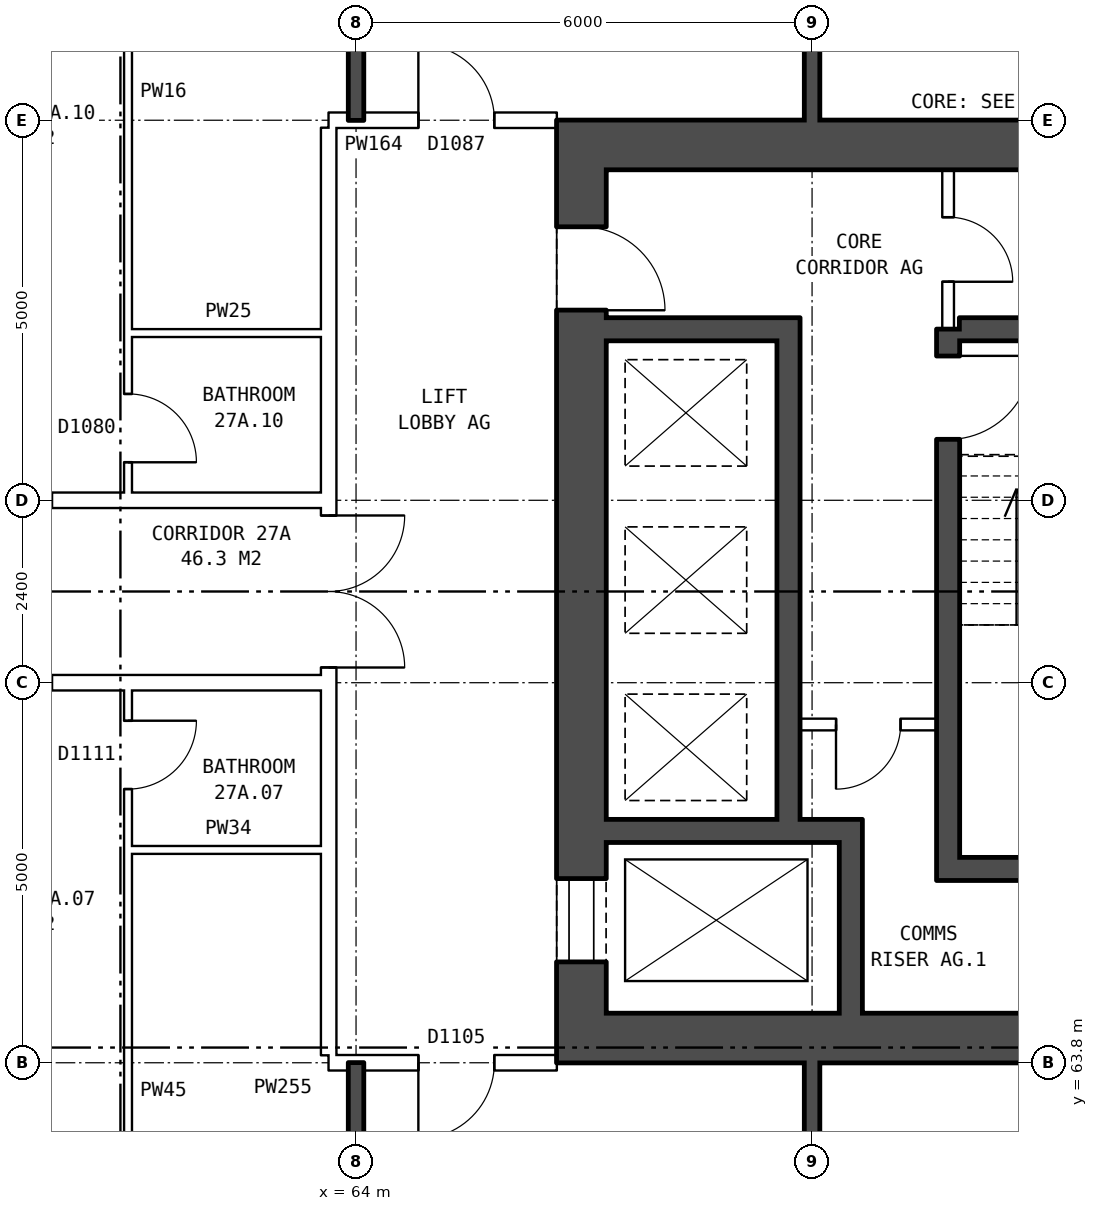
"""IFC4 building model, lengths in metres.
Left out: names, types, materials, properties, quantities, classifications, styles, units other than length and angle.
Written with IfcOpenShell. Run it as: python <this file> out.ifc"""

import sys

from ifc_helpers import new_model, si_unit, direction, frame, frame_2d, origin, place, context, subcontext, project, spatial, rectangle, extrude, element, fill, save


model = new_model("IFC4")
c1 = context("Model", 3, precision=1e-05, world=origin(), true_north=direction((0.0, 1.0)))
c2 = subcontext(c1, "Body", "Model", "MODEL_VIEW")
j1 = project(units=[si_unit("LENGTHUNIT", "METRE"), si_unit("PLANEANGLEUNIT", "RADIAN")], contexts=[c1])
p1 = place(None, origin())
s1 = spatial("IfcSite", under=j1, at=p1, CompositionType="ELEMENT")
p2 = place(p1, origin())
s2 = spatial("IfcBuilding", under=s1, at=p2, CompositionType="ELEMENT")
p3 = place(p2, frame((0.0, 0.0, 99.5)))
s3 = spatial("IfcBuildingStorey", under=s2, at=p3, CompositionType="ELEMENT", Elevation=99.5)
p4 = place(p3, frame((66.965, 64.45, 0.0), z_axis=(0.0, 0.0, 1.0), x_axis=(0.0, 1.0, 0.0)))
e1 = element("IfcWall", 1, at=p4, inside=s3, PredefinedType="SHEAR", context=c2, shape_type="SweptSolid", body=[
    extrude(rectangle(XDim=11.1, YDim=0.65, at=frame_2d((5.55, 0.0))), origin(), (0.0, 0.0, 1.0), 2.85),
])
p5 = place(p4, frame((0.675, 0.0, 0.0)))
e2 = element("IfcOpeningElement", 2, at=p5, cuts=e1, PredefinedType="OPENING", context=c2, shape_type="SweptSolid", body=[
    extrude(rectangle(XDim=1.1, YDim=2.1, at=frame_2d((0.55, 1.05))), frame((0.0, 0.335, 0.0), z_axis=(0.0, -1.0, 0.0), x_axis=(1.0, 0.0, 0.0)), (0.0, 0.0, 1.0), 0.67),
])
p6 = place(p4, frame((9.25, 0.0, 0.0)))
e3 = element("IfcOpeningElement", 3, at=p6, cuts=e1, PredefinedType="OPENING", context=c2, shape_type="SweptSolid", body=[
    extrude(rectangle(XDim=1.1, YDim=2.1, at=frame_2d((0.55, 1.05))), frame((0.0, 0.335, 0.0), z_axis=(0.0, -1.0, 0.0), x_axis=(1.0, 0.0, 0.0)), (0.0, 0.0, 1.0), 0.67),
])
for number, where, z_axis, x_axis in (
    (4, (66.64, 64.125, 0.0), (0.0, 0.0, 1.0), (1.0, 0.0, 0.0)),
    (5, (66.64, 75.875, 0.0), (0.0, 0.0, 1.0), (1.0, 0.0, 0.0)),
):
    element("IfcWall", number, at=place(p3, frame(where, z_axis=z_axis, x_axis=x_axis)), inside=s3, PredefinedType="SHEAR", context=c2, shape_type="SweptSolid", body=[
        extrude(rectangle(XDim=9.0, YDim=0.65, at=frame_2d((4.5, 0.0))), origin(), (0.0, 0.0, 1.0), 2.85),
    ])
p7 = place(p3, frame((71.94, 66.35, 0.0), z_axis=(0.0, 0.0, 1.0), x_axis=(1.0, 0.0, 0.0)))
e6 = element("IfcWall", 6, at=p7, inside=s3, PredefinedType="SHEAR", context=c2, shape_type="SweptSolid", body=[
    extrude(rectangle(XDim=3.05, YDim=0.3, at=frame_2d((1.525, 0.0))), origin(), (0.0, 0.0, 1.0), 2.85),
])
p8 = place(p3, frame((67.29, 66.85, 0.0), z_axis=(0.0, 0.0, 1.0), x_axis=(1.0, 0.0, 0.0)))
e7 = element("IfcWall", 7, at=p8, inside=s3, PredefinedType="SHEAR", context=c2, shape_type="SweptSolid", body=[
    extrude(rectangle(XDim=3.37, YDim=0.3, at=frame_2d((1.685, 0.0))), origin(), (0.0, 0.0, 1.0), 2.85),
])
p9 = place(p3, frame((69.84, 68.25, 0.0), z_axis=(0.0, 0.0, 1.0), x_axis=(1.0, 0.0, 0.0)))
e8 = element("IfcWall", 8, at=p9, inside=s3, PredefinedType="PARTITIONING", context=c2, shape_type="SweptSolid", body=[
    extrude(rectangle(XDim=1.8, YDim=0.15, at=frame_2d((0.9, 0.0))), origin(), (0.0, 0.0, 1.0), 2.85),
])
p10 = place(p9, frame((0.475, 0.0, 0.0)))
e9 = element("IfcOpeningElement", 9, at=p10, cuts=e8, PredefinedType="OPENING", context=c2, shape_type="SweptSolid", body=[
    extrude(rectangle(XDim=0.85, YDim=2.1, at=frame_2d((0.425, 1.05))), frame((0.0, 0.085, 0.0), z_axis=(0.0, -1.0, 0.0), x_axis=(1.0, 0.0, 0.0)), (0.0, 0.0, 1.0), 0.17),
])
p11 = place(p3, frame((67.29, 73.45, 0.0), z_axis=(0.0, 0.0, 1.0), x_axis=(1.0, 0.0, 0.0)))
e10 = element("IfcWall", 10, at=p11, inside=s3, PredefinedType="SHEAR", context=c2, shape_type="SweptSolid", body=[
    extrude(rectangle(XDim=2.25, YDim=0.3, at=frame_2d((1.125, 0.0))), origin(), (0.0, 0.0, 1.0), 2.85),
])
p12 = place(p3, frame((71.94, 73.45, 0.0), z_axis=(0.0, 0.0, 1.0), x_axis=(1.0, 0.0, 0.0)))
e11 = element("IfcWall", 11, at=p12, inside=s3, PredefinedType="SHEAR", context=c2, shape_type="SweptSolid", body=[
    extrude(rectangle(XDim=3.05, YDim=0.3, at=frame_2d((1.525, 0.0))), origin(), (0.0, 0.0, 1.0), 2.85),
])
p13 = place(p3, frame((69.69, 67.0, 0.0), z_axis=(0.0, 0.0, 1.0), x_axis=(0.0, 1.0, 0.0)))
e12 = element("IfcWall", 12, at=p13, inside=s3, PredefinedType="SHEAR", context=c2, shape_type="SweptSolid", body=[
    extrude(rectangle(XDim=6.6, YDim=0.3, at=frame_2d((3.3, 0.0))), origin(), (0.0, 0.0, 1.0), 2.85),
])
p14 = place(p3, frame((70.51, 64.45, 0.0), z_axis=(0.0, 0.0, 1.0), x_axis=(0.0, 1.0, 0.0)))
e13 = element("IfcWall", 13, at=p14, inside=s3, PredefinedType="SHEAR", context=c2, shape_type="SweptSolid", body=[
    extrude(rectangle(XDim=2.25, YDim=0.3, at=frame_2d((1.125, 0.0))), origin(), (0.0, 0.0, 1.0), 2.85),
])
p15 = place(p3, frame((71.79, 66.2, 0.0), z_axis=(0.0, 0.0, 1.0), x_axis=(0.0, 1.0, 0.0)))
e14 = element("IfcWall", 14, at=p15, inside=s3, PredefinedType="SHEAR", context=c2, shape_type="SweptSolid", body=[
    extrude(rectangle(XDim=7.25, YDim=0.3, at=frame_2d((3.625, 0.0))), origin(), (0.0, 0.0, 1.0), 2.85),
])
p16 = place(p15, frame((5.8, 0.0, 0.0)))
e15 = element("IfcOpeningElement", 15, at=p16, cuts=e14, PredefinedType="OPENING", context=c2, shape_type="SweptSolid", body=[
    extrude(rectangle(XDim=1.1, YDim=2.1, at=frame_2d((0.55, 1.05))), frame((0.0, 0.16, 0.0), z_axis=(0.0, -1.0, 0.0), x_axis=(1.0, 0.0, 0.0)), (0.0, 0.0, 1.0), 0.32),
])
p17 = place(p3, frame((71.79, 73.45, 0.0), z_axis=(0.0, 0.0, 1.0), x_axis=(0.0, 1.0, 0.0)))
e16 = element("IfcWall", 16, at=p17, inside=s3, PredefinedType="PARTITIONING", context=c2, shape_type="SweptSolid", body=[
    extrude(rectangle(XDim=2.1, YDim=0.15, at=frame_2d((1.05, 0.0))), origin(), (0.0, 0.0, 1.0), 2.85),
])
p18 = place(p17, frame((0.625, 0.0, 0.0)))
e17 = element("IfcOpeningElement", 17, at=p18, cuts=e16, PredefinedType="OPENING", context=c2, shape_type="SweptSolid", body=[
    extrude(rectangle(XDim=0.85, YDim=2.1, at=frame_2d((0.425, 1.05))), frame((0.0, 0.085, 0.0), z_axis=(0.0, -1.0, 0.0), x_axis=(1.0, 0.0, 0.0)), (0.0, 0.0, 1.0), 0.17),
])
p19 = place(p3, frame((63.64, 63.9, 0.0), z_axis=(0.0, 0.0, 1.0), x_axis=(0.0, 1.0, 0.0)))
e18 = element("IfcWall", 18, at=p19, inside=s3, PredefinedType="PARTITIONING", context=c2, shape_type="SweptSolid", body=[
    extrude(rectangle(XDim=12.2, YDim=0.2, at=frame_2d((6.1, 0.0))), origin(), (0.0, 0.0, 1.0), 2.85),
])
p20 = place(p19, frame((5.1, 0.0, 0.0)))
e19 = element("IfcOpeningElement", 19, at=p20, cuts=e18, PredefinedType="OPENING", context=c2, shape_type="SweptSolid", body=[
    extrude(rectangle(XDim=2.0, YDim=2.1, at=frame_2d((1.0, 1.05))), frame((0.0, 0.11, 0.0), z_axis=(0.0, -1.0, 0.0), x_axis=(1.0, 0.0, 0.0)), (0.0, 0.0, 1.0), 0.22),
])
p21 = place(p3, frame((63.64, 63.8, 0.0), z_axis=(0.0, 0.0, 1.0), x_axis=(1.0, 0.0, 0.0)))
e20 = element("IfcWall", 20, at=p21, inside=s3, PredefinedType="PARTITIONING", context=c2, shape_type="SweptSolid", body=[
    extrude(rectangle(XDim=3.0, YDim=0.2, at=frame_2d((1.5, 0.0))), origin(), (0.0, 0.0, 1.0), 2.85),
])
p22 = place(p21, frame((1.18, 0.0, 0.0)))
e21 = element("IfcOpeningElement", 21, at=p22, cuts=e20, PredefinedType="OPENING", context=c2, shape_type="SweptSolid", body=[
    extrude(rectangle(XDim=1.0, YDim=2.1, at=frame_2d((0.5, 1.05))), frame((0.0, 0.11, 0.0), z_axis=(0.0, -1.0, 0.0), x_axis=(1.0, 0.0, 0.0)), (0.0, 0.0, 1.0), 0.22),
])
p23 = place(p3, frame((61.0, 66.6, 0.0), z_axis=(0.0, 0.0, 1.0), x_axis=(1.0, 0.0, 0.0)))
e22 = element("IfcWall", 22, at=p23, inside=s3, PredefinedType="PARTITIONING", context=c2, shape_type="SweptSolid", body=[
    extrude(rectangle(XDim=2.64, YDim=0.1, at=frame_2d((1.32, 0.0))), origin(), (0.0, 0.0, 1.0), 2.85),
])
p24 = place(p3, frame((44.36, 68.8, 0.0), z_axis=(0.0, 0.0, 1.0), x_axis=(1.0, 0.0, 0.0)))
e23 = element("IfcWall", 23, at=p24, inside=s3, PredefinedType="PARTITIONING", context=c2, shape_type="SweptSolid", body=[
    extrude(rectangle(XDim=19.28, YDim=0.2, at=frame_2d((9.64, 0.0))), origin(), (0.0, 0.0, 1.0), 2.85),
])
p25 = place(p24, frame((14.64, 0.0, 0.0)))
e24 = element("IfcOpeningElement", 24, at=p25, cuts=e23, PredefinedType="OPENING", context=c2, shape_type="SweptSolid", body=[
    extrude(rectangle(XDim=1.0, YDim=2.1, at=frame_2d((0.5, 1.05))), frame((0.0, 0.11, 0.0), z_axis=(0.0, -1.0, 0.0), x_axis=(1.0, 0.0, 0.0)), (0.0, 0.0, 1.0), 0.22),
])
p26 = place(p24, frame((11.64, 0.0, 0.0)))
e25 = element("IfcOpeningElement", 25, at=p26, cuts=e23, PredefinedType="OPENING", context=c2, shape_type="SweptSolid", body=[
    extrude(rectangle(XDim=1.0, YDim=2.1, at=frame_2d((0.5, 1.05))), frame((0.0, 0.11, 0.0), z_axis=(0.0, -1.0, 0.0), x_axis=(1.0, 0.0, 0.0)), (0.0, 0.0, 1.0), 0.22),
])
p27 = place(p24, frame((5.64, 0.0, 0.0)))
e26 = element("IfcOpeningElement", 26, at=p27, cuts=e23, PredefinedType="OPENING", context=c2, shape_type="SweptSolid", body=[
    extrude(rectangle(XDim=1.0, YDim=2.1, at=frame_2d((0.5, 1.05))), frame((0.0, 0.11, 0.0), z_axis=(0.0, -1.0, 0.0), x_axis=(1.0, 0.0, 0.0)), (0.0, 0.0, 1.0), 0.22),
])
p28 = place(p3, frame((44.36, 71.2, 0.0), z_axis=(0.0, 0.0, 1.0), x_axis=(1.0, 0.0, 0.0)))
e27 = element("IfcWall", 27, at=p28, inside=s3, PredefinedType="PARTITIONING", context=c2, shape_type="SweptSolid", body=[
    extrude(rectangle(XDim=19.28, YDim=0.2, at=frame_2d((9.64, 0.0))), origin(), (0.0, 0.0, 1.0), 2.85),
])
p29 = place(p28, frame((14.64, 0.0, 0.0)))
e28 = element("IfcOpeningElement", 28, at=p29, cuts=e27, PredefinedType="OPENING", context=c2, shape_type="SweptSolid", body=[
    extrude(rectangle(XDim=1.0, YDim=2.1, at=frame_2d((0.5, 1.05))), frame((0.0, 0.11, 0.0), z_axis=(0.0, -1.0, 0.0), x_axis=(1.0, 0.0, 0.0)), (0.0, 0.0, 1.0), 0.22),
])
p30 = place(p28, frame((5.64, 0.0, 0.0)))
e29 = element("IfcOpeningElement", 29, at=p30, cuts=e27, PredefinedType="OPENING", context=c2, shape_type="SweptSolid", body=[
    extrude(rectangle(XDim=1.0, YDim=2.1, at=frame_2d((0.5, 1.05))), frame((0.0, 0.11, 0.0), z_axis=(0.0, -1.0, 0.0), x_axis=(1.0, 0.0, 0.0)), (0.0, 0.0, 1.0), 0.22),
])
p31 = place(p3, frame((61.0, 73.4, 0.0), z_axis=(0.0, 0.0, 1.0), x_axis=(1.0, 0.0, 0.0)))
e30 = element("IfcWall", 30, at=p31, inside=s3, PredefinedType="PARTITIONING", context=c2, shape_type="SweptSolid", body=[
    extrude(rectangle(XDim=2.64, YDim=0.1, at=frame_2d((1.32, 0.0))), origin(), (0.0, 0.0, 1.0), 2.85),
])
p32 = place(p3, frame((63.64, 76.2, 0.0), z_axis=(0.0, 0.0, 1.0), x_axis=(1.0, 0.0, 0.0)))
e31 = element("IfcWall", 31, at=p32, inside=s3, PredefinedType="PARTITIONING", context=c2, shape_type="SweptSolid", body=[
    extrude(rectangle(XDim=3.0, YDim=0.2, at=frame_2d((1.5, 0.0))), origin(), (0.0, 0.0, 1.0), 2.85),
])
p33 = place(p32, frame((1.18, 0.0, 0.0)))
e32 = element("IfcOpeningElement", 32, at=p33, cuts=e31, PredefinedType="OPENING", context=c2, shape_type="SweptSolid", body=[
    extrude(rectangle(XDim=1.0, YDim=2.1, at=frame_2d((0.5, 1.05))), frame((0.0, 0.11, 0.0), z_axis=(0.0, -1.0, 0.0), x_axis=(1.0, 0.0, 0.0)), (0.0, 0.0, 1.0), 0.22),
])
p34 = place(p3, frame((61.0, 54.36, 0.0), z_axis=(0.0, 0.0, 1.0), x_axis=(0.0, 1.0, 0.0)))
e33 = element("IfcWall", 33, at=p34, inside=s3, PredefinedType="PARTITIONING", context=c2, shape_type="SweptSolid", body=[
    extrude(rectangle(XDim=14.34, YDim=0.1, at=frame_2d((7.17, 0.0))), origin(), (0.0, 0.0, 1.0), 2.85),
])
p35 = place(p34, frame((4.2, 0.0, 0.0)))
e34 = element("IfcOpeningElement", 34, at=p35, cuts=e33, PredefinedType="OPENING", context=c2, shape_type="SweptSolid", body=[
    extrude(rectangle(XDim=0.9, YDim=2.1, at=frame_2d((0.45, 1.05))), frame((0.0, 0.06, 0.0), z_axis=(0.0, -1.0, 0.0), x_axis=(1.0, 0.0, 0.0)), (0.0, 0.0, 1.0), 0.12),
])
p36 = place(p34, frame((13.04, 0.0, 0.0)))
e35 = element("IfcOpeningElement", 35, at=p36, cuts=e33, PredefinedType="OPENING", context=c2, shape_type="SweptSolid", body=[
    extrude(rectangle(XDim=0.9, YDim=2.1, at=frame_2d((0.45, 1.05))), frame((0.0, 0.06, 0.0), z_axis=(0.0, -1.0, 0.0), x_axis=(1.0, 0.0, 0.0)), (0.0, 0.0, 1.0), 0.12),
])
p37 = place(p3, frame((61.0, 71.3, 0.0), z_axis=(0.0, 0.0, 1.0), x_axis=(0.0, 1.0, 0.0)))
e36 = element("IfcWall", 36, at=p37, inside=s3, PredefinedType="PARTITIONING", context=c2, shape_type="SweptSolid", body=[
    extrude(rectangle(XDim=14.34, YDim=0.1, at=frame_2d((7.17, 0.0))), origin(), (0.0, 0.0, 1.0), 2.85),
])
p38 = place(p37, frame((9.24, 0.0, 0.0)))
e37 = element("IfcOpeningElement", 37, at=p38, cuts=e36, PredefinedType="OPENING", context=c2, shape_type="SweptSolid", body=[
    extrude(rectangle(XDim=0.9, YDim=2.1, at=frame_2d((0.45, 1.05))), frame((0.0, 0.06, 0.0), z_axis=(0.0, -1.0, 0.0), x_axis=(1.0, 0.0, 0.0)), (0.0, 0.0, 1.0), 0.12),
])
p39 = place(p37, frame((0.4, 0.0, 0.0)))
e38 = element("IfcOpeningElement", 38, at=p39, cuts=e36, PredefinedType="OPENING", context=c2, shape_type="SweptSolid", body=[
    extrude(rectangle(XDim=0.9, YDim=2.1, at=frame_2d((0.45, 1.05))), frame((0.0, 0.06, 0.0), z_axis=(0.0, -1.0, 0.0), x_axis=(1.0, 0.0, 0.0)), (0.0, 0.0, 1.0), 0.12),
])
for number, where, z_axis, x_axis in (
    (39, (64.0, 54.36, 0.0), (0.0, 0.0, 1.0), (0.0, 1.0, 0.0)),
    (40, (64.0, 76.2, 0.0), (0.0, 0.0, 1.0), (0.0, 1.0, 0.0)),
):
    element("IfcWall", number, at=place(p3, frame(where, z_axis=z_axis, x_axis=x_axis)), inside=s3, PredefinedType="SOLIDWALL", context=c2, shape_type="SweptSolid", body=[
        extrude(rectangle(XDim=9.44, YDim=0.2, at=frame_2d((4.72, 0.0))), origin(), (0.0, 0.0, 1.0), 2.85),
    ])
p40 = place(p3, frame((70.0, 54.36, 0.0), z_axis=(0.0, 0.0, 1.0), x_axis=(0.0, 1.0, 0.0)))
e41 = element("IfcWall", 41, at=p40, inside=s3, PredefinedType="SOLIDWALL", context=c2, shape_type="SweptSolid", body=[
    extrude(rectangle(XDim=9.44, YDim=0.2, at=frame_2d((4.72, 0.0))), origin(), (0.0, 0.0, 1.0), 2.85),
])
p41 = place(p40, frame((2.47, 0.0, 0.0)))
e42 = element("IfcOpeningElement", 42, at=p41, cuts=e41, PredefinedType="OPENING", context=c2, shape_type="SweptSolid", body=[
    extrude(rectangle(XDim=0.9, YDim=2.1, at=frame_2d((0.45, 1.05))), frame((0.0, 0.11, 0.0), z_axis=(0.0, -1.0, 0.0), x_axis=(1.0, 0.0, 0.0)), (0.0, 0.0, 1.0), 0.22),
])
p42 = place(p40, frame((7.59, 0.0, 0.0)))
e43 = element("IfcOpeningElement", 43, at=p42, cuts=e41, PredefinedType="OPENING", context=c2, shape_type="SweptSolid", body=[
    extrude(rectangle(XDim=0.9, YDim=2.1, at=frame_2d((0.45, 1.05))), frame((0.0, 0.11, 0.0), z_axis=(0.0, -1.0, 0.0), x_axis=(1.0, 0.0, 0.0)), (0.0, 0.0, 1.0), 0.22),
])
p43 = place(p3, frame((70.0, 76.2, 0.0), z_axis=(0.0, 0.0, 1.0), x_axis=(0.0, 1.0, 0.0)))
e44 = element("IfcWall", 44, at=p43, inside=s3, PredefinedType="SOLIDWALL", context=c2, shape_type="SweptSolid", body=[
    extrude(rectangle(XDim=9.44, YDim=0.2, at=frame_2d((4.72, 0.0))), origin(), (0.0, 0.0, 1.0), 2.85),
])
p44 = place(p43, frame((1.5, 0.0, 0.0)))
e45 = element("IfcOpeningElement", 45, at=p44, cuts=e44, PredefinedType="OPENING", context=c2, shape_type="SweptSolid", body=[
    extrude(rectangle(XDim=0.9, YDim=2.1, at=frame_2d((0.45, 1.05))), frame((0.0, 0.11, 0.0), z_axis=(0.0, -1.0, 0.0), x_axis=(1.0, 0.0, 0.0)), (0.0, 0.0, 1.0), 0.22),
])
p45 = place(p5, origin())
e46 = element("IfcDoor", 46, at=p45, inside=s3, OperationType="DOUBLE_DOOR_SLIDING", PredefinedType="DOOR", context=c2, shape_type="SweptSolid", body=[
    extrude(rectangle(XDim=1.1, YDim=2.1, at=frame_2d((0.55, 1.05))), frame((0.0, -0.26, 0.0), z_axis=(0.0, -1.0, 0.0), x_axis=(1.0, 0.0, 0.0)), (0.0, 0.0, 1.0), 0.05),
])
fill(e2, e46)
p46 = place(p6, frame((1.1, 0.0, 0.0), z_axis=(0.0, 0.0, 1.0), x_axis=(-1.0, 0.0, 0.0)))
e47 = element("IfcDoor", 47, at=p46, inside=s3, OperationType="SINGLE_SWING_RIGHT", PredefinedType="DOOR", context=c2, shape_type="SweptSolid", body=[
    extrude(rectangle(XDim=1.1, YDim=2.1, at=frame_2d((0.55, 1.05))), frame((0.0, 0.31, 0.0), z_axis=(0.0, -1.0, 0.0), x_axis=(1.0, 0.0, 0.0)), (0.0, 0.0, 1.0), 0.05),
])
fill(e3, e47)
p47 = place(p16, frame((1.1, 0.0, 0.0), z_axis=(0.0, 0.0, 1.0), x_axis=(-1.0, 0.0, 0.0)))
e48 = element("IfcDoor", 48, at=p47, inside=s3, OperationType="SINGLE_SWING_LEFT", PredefinedType="DOOR", context=c2, shape_type="SweptSolid", body=[
    extrude(rectangle(XDim=1.1, YDim=2.1, at=frame_2d((0.55, 1.05))), frame((0.0, 0.025, 0.0), z_axis=(0.0, -1.0, 0.0), x_axis=(1.0, 0.0, 0.0)), (0.0, 0.0, 1.0), 0.05),
])
fill(e15, e48)
p48 = place(p10, frame((0.85, 0.0, 0.0), z_axis=(0.0, 0.0, 1.0), x_axis=(-1.0, 0.0, 0.0)))
e49 = element("IfcDoor", 49, at=p48, inside=s3, OperationType="SINGLE_SWING_RIGHT", PredefinedType="DOOR", context=c2, shape_type="SweptSolid", body=[
    extrude(rectangle(XDim=0.85, YDim=2.1, at=frame_2d((0.425, 1.05))), frame((0.0, 0.025, 0.0), z_axis=(0.0, -1.0, 0.0), x_axis=(1.0, 0.0, 0.0)), (0.0, 0.0, 1.0), 0.05),
])
fill(e9, e49)
p49 = place(p18, frame((0.85, 0.0, 0.0), z_axis=(0.0, 0.0, 1.0), x_axis=(-1.0, 0.0, 0.0)))
e50 = element("IfcDoor", 50, at=p49, inside=s3, OperationType="SINGLE_SWING_RIGHT", PredefinedType="DOOR", context=c2, shape_type="SweptSolid", body=[
    extrude(rectangle(XDim=0.85, YDim=2.1, at=frame_2d((0.425, 1.05))), frame((0.0, 0.025, 0.0), z_axis=(0.0, -1.0, 0.0), x_axis=(1.0, 0.0, 0.0)), (0.0, 0.0, 1.0), 0.05),
])
fill(e17, e50)
p50 = place(p20, frame((2.0, 0.0, 0.0), z_axis=(0.0, 0.0, 1.0), x_axis=(-1.0, 0.0, 0.0)))
e51 = element("IfcDoor", 51, at=p50, inside=s3, OperationType="DOUBLE_DOOR_SINGLE_SWING", PredefinedType="DOOR", context=c2, shape_type="SweptSolid", body=[
    extrude(rectangle(XDim=2.0, YDim=2.1, at=frame_2d((1.0, 1.05))), frame((0.0, 0.025, 0.0), z_axis=(0.0, -1.0, 0.0), x_axis=(1.0, 0.0, 0.0)), (0.0, 0.0, 1.0), 0.05),
])
fill(e19, e51)
p51 = place(p22, frame((1.0, 0.0, 0.0), z_axis=(0.0, 0.0, 1.0), x_axis=(-1.0, 0.0, 0.0)))
e52 = element("IfcDoor", 52, at=p51, inside=s3, OperationType="SINGLE_SWING_RIGHT", PredefinedType="DOOR", context=c2, shape_type="SweptSolid", body=[
    extrude(rectangle(XDim=1.0, YDim=2.1, at=frame_2d((0.5, 1.05))), frame((0.0, 0.025, 0.0), z_axis=(0.0, -1.0, 0.0), x_axis=(1.0, 0.0, 0.0)), (0.0, 0.0, 1.0), 0.05),
])
fill(e21, e52)
p52 = place(p33, origin())
e53 = element("IfcDoor", 53, at=p52, inside=s3, OperationType="SINGLE_SWING_LEFT", PredefinedType="DOOR", context=c2, shape_type="SweptSolid", body=[
    extrude(rectangle(XDim=1.0, YDim=2.1, at=frame_2d((0.5, 1.05))), frame((0.0, 0.025, 0.0), z_axis=(0.0, -1.0, 0.0), x_axis=(1.0, 0.0, 0.0)), (0.0, 0.0, 1.0), 0.05),
])
fill(e32, e53)
p53 = place(p36, frame((0.9, 0.0, 0.0), z_axis=(0.0, 0.0, 1.0), x_axis=(-1.0, 0.0, 0.0)))
e54 = element("IfcDoor", 54, at=p53, inside=s3, OperationType="SINGLE_SWING_LEFT", PredefinedType="DOOR", context=c2, shape_type="SweptSolid", body=[
    extrude(rectangle(XDim=0.9, YDim=2.1, at=frame_2d((0.45, 1.05))), frame((0.0, 0.025, 0.0), z_axis=(0.0, -1.0, 0.0), x_axis=(1.0, 0.0, 0.0)), (0.0, 0.0, 1.0), 0.05),
])
fill(e35, e54)
p54 = place(p39, frame((0.9, 0.0, 0.0), z_axis=(0.0, 0.0, 1.0), x_axis=(-1.0, 0.0, 0.0)))
e55 = element("IfcDoor", 55, at=p54, inside=s3, OperationType="SINGLE_SWING_RIGHT", PredefinedType="DOOR", context=c2, shape_type="SweptSolid", body=[
    extrude(rectangle(XDim=0.9, YDim=2.1, at=frame_2d((0.45, 1.05))), frame((0.0, 0.025, 0.0), z_axis=(0.0, -1.0, 0.0), x_axis=(1.0, 0.0, 0.0)), (0.0, 0.0, 1.0), 0.05),
])
fill(e38, e55)
save(model, sys.argv[1])
